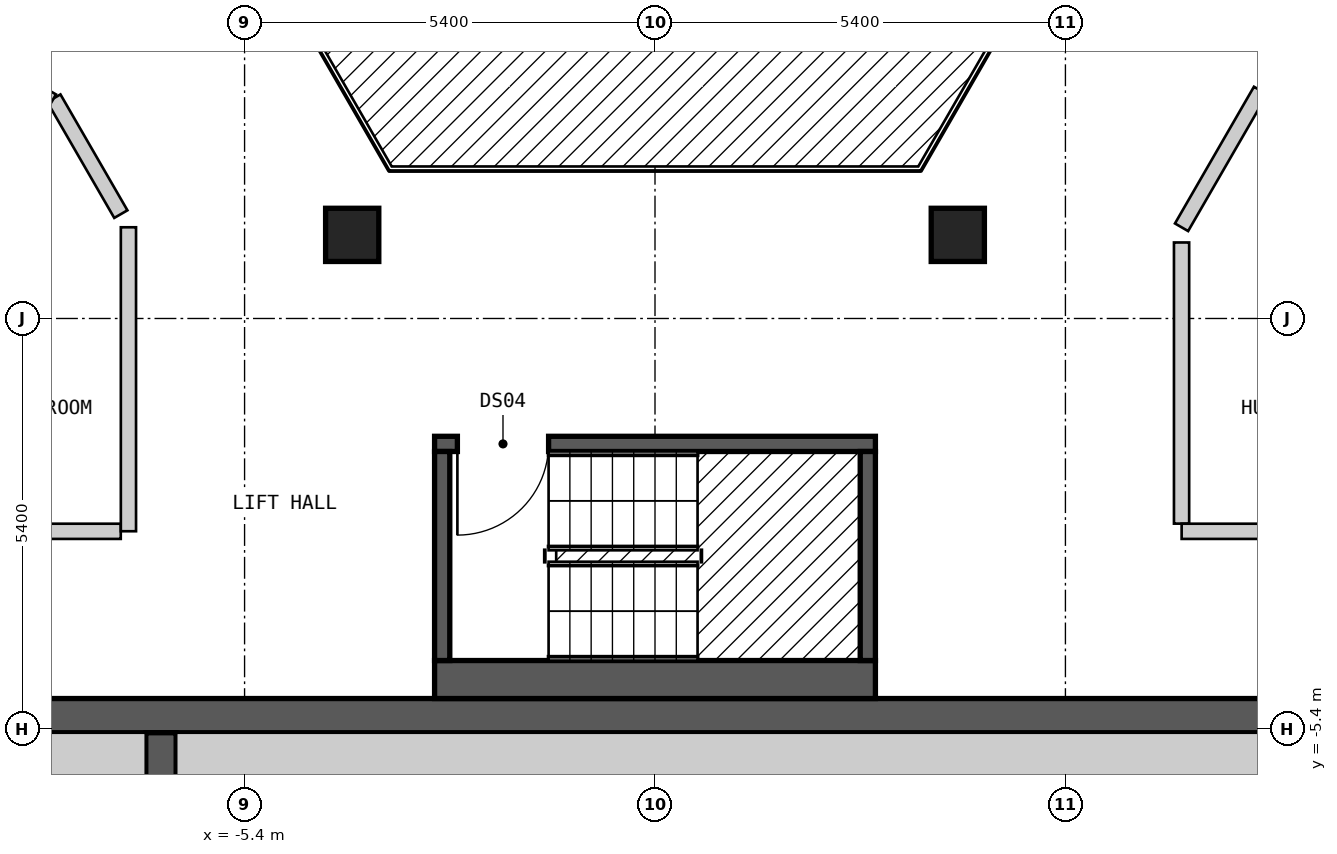
"""IFC4 building model, lengths in metres.
Left out: names, types, materials, properties, quantities, classifications, styles, units other than length and angle.
Written with IfcOpenShell. Run it as: python <this file> out.ifc"""

import sys

from ifc_helpers import new_model, si_unit, direction, frame, frame_2d, origin, origin_2d, place, context, subcontext, project, spatial, rectangle, extrude, element, fill, save


model = new_model("IFC4")
c1 = context("Model", 3, precision=1e-05, world=origin(), true_north=direction((0.0, 1.0)))
c2 = subcontext(c1, "Body", "Model", "MODEL_VIEW")
j1 = project(units=[si_unit("LENGTHUNIT", "METRE"), si_unit("PLANEANGLEUNIT", "RADIAN")], contexts=[c1])
p1 = place(None, origin())
s1 = spatial("IfcSite", under=j1, at=p1, CompositionType="ELEMENT")
p2 = place(p1, origin())
s2 = spatial("IfcBuilding", under=s1, at=p2, CompositionType="ELEMENT")
p3 = place(p2, frame((0.0, 0.0, 205.8)))
s3 = spatial("IfcBuildingStorey", under=s2, at=p3, CompositionType="ELEMENT", Elevation=205.8)
for number, where, z_axis, x_axis in (
    (1, (3.984, 1.1, 0.0), (0.0, 0.0, 1.0), (1.0, 0.0, 0.0)),
    (2, (-3.984, 1.1, 0.0), (0.0, 0.0, 1.0), (1.0, 0.0, 0.0)),
):
    element("IfcColumn", number, at=place(p3, frame(where, z_axis=z_axis, x_axis=x_axis)), inside=s3, PredefinedType="COLUMN", context=c2, shape_type="SweptSolid", body=[
        extrude(rectangle(XDim=0.7, YDim=0.7, at=origin_2d()), origin(), (0.0, 0.0, 1.0), 3.0),
    ])
p4 = place(p3, frame((-13.3, -5.225, 0.0), z_axis=(0.0, 0.0, 1.0), x_axis=(1.0, 0.0, 0.0)))
e3 = element("IfcWall", 3, at=p4, inside=s3, PredefinedType="SHEAR", context=c2, shape_type="SweptSolid", body=[
    extrude(rectangle(XDim=26.6, YDim=0.45, at=frame_2d((13.3, 0.0))), origin(), (0.0, 0.0, 1.0), 2.7),
])
p5 = place(p4, frame((23.65, 0.0, 0.0)))
e4 = element("IfcOpeningElement", 4, at=p5, cuts=e3, PredefinedType="OPENING", context=c2, shape_type="SweptSolid", body=[
    extrude(rectangle(XDim=1.2, YDim=2.1, at=frame_2d((0.6, 1.05))), frame((0.0, 0.235, 0.0), z_axis=(0.0, -1.0, 0.0), x_axis=(1.0, 0.0, 0.0)), (0.0, 0.0, 1.0), 0.47),
])
p6 = place(p3, frame((-6.5, -9.15, 0.0), z_axis=(0.0, 0.0, 1.0), x_axis=(0.0, 1.0, 0.0)))
e5 = element("IfcWall", 5, at=p6, inside=s3, PredefinedType="SHEAR", context=c2, shape_type="SweptSolid", body=[
    extrude(rectangle(XDim=3.7, YDim=0.4, at=frame_2d((1.85, 0.0))), origin(), (0.0, 0.0, 1.0), 2.7),
])
p7 = place(p3, frame((-2.9, -4.75, 0.0), z_axis=(0.0, 0.0, 1.0), x_axis=(1.0, 0.0, 0.0)))
e6 = element("IfcWall", 6, at=p7, inside=s3, PredefinedType="SOLIDWALL", context=c2, shape_type="SweptSolid", body=[
    extrude(rectangle(XDim=5.8, YDim=0.5, at=frame_2d((2.9, 0.0))), origin(), (0.0, 0.0, 1.0), 2.7),
])
p8 = place(p3, frame((-2.9, -1.65, 0.0), z_axis=(0.0, 0.0, 1.0), x_axis=(1.0, 0.0, 0.0)))
e7 = element("IfcWall", 7, at=p8, inside=s3, PredefinedType="SOLIDWALL", context=c2, shape_type="SweptSolid", body=[
    extrude(rectangle(XDim=5.8, YDim=0.2, at=frame_2d((2.9, 0.0))), origin(), (0.0, 0.0, 1.0), 2.7),
])
p9 = place(p8, frame((0.3, 0.0, 0.0)))
e8 = element("IfcOpeningElement", 8, at=p9, cuts=e7, PredefinedType="OPENING", context=c2, shape_type="SweptSolid", body=[
    extrude(rectangle(XDim=1.2, YDim=2.1, at=frame_2d((0.6, 1.05))), frame((0.0, 0.11, 0.0), z_axis=(0.0, -1.0, 0.0), x_axis=(1.0, 0.0, 0.0)), (0.0, 0.0, 1.0), 0.22),
])
for number, where, z_axis, x_axis in (
    (9, (-2.8, -4.5, 0.0), (0.0, 0.0, 1.0), (0.0, 1.0, 0.0)),
    (10, (2.8, -4.5, 0.0), (0.0, 0.0, 1.0), (0.0, 1.0, 0.0)),
):
    element("IfcWall", number, at=place(p3, frame(where, z_axis=z_axis, x_axis=x_axis)), inside=s3, PredefinedType="SOLIDWALL", context=c2, shape_type="SweptSolid", body=[
        extrude(rectangle(XDim=2.75, YDim=0.2, at=frame_2d((1.375, 0.0))), origin(), (0.0, 0.0, 1.0), 2.7),
    ])
p10 = place(p3, frame((-7.909, 2.898, 0.0), z_axis=(0.0, 0.0, 1.0), x_axis=(0.50019444547, -0.865913111531, 0.0)))
e11 = element("IfcWall", 11, at=p10, inside=s3, PredefinedType="PARTITIONING", context=c2, shape_type="SweptSolid", body=[
    extrude(rectangle(XDim=1.761, YDim=0.2, at=frame_2d((0.88, 0.0))), origin(), (0.0, 0.0, 1.0), 2.7),
])
p11 = place(p3, frame((6.928, 1.0, 0.0), z_axis=(0.0, 0.0, 1.0), x_axis=(0.0, -1.0, 0.0)))
e12 = element("IfcWall", 12, at=p11, inside=s3, PredefinedType="PARTITIONING", context=c2, shape_type="SweptSolid", body=[
    extrude(rectangle(XDim=3.699, YDim=0.2, at=frame_2d((1.85, 0.0))), origin(), (0.0, 0.0, 1.0), 2.7),
])
p12 = place(p3, frame((-9.93, -2.8, 0.0), z_axis=(0.0, 0.0, 1.0), x_axis=(1.0, 0.0, 0.0)))
e13 = element("IfcWall", 13, at=p12, inside=s3, PredefinedType="PARTITIONING", context=c2, shape_type="SweptSolid", body=[
    extrude(rectangle(XDim=2.901, YDim=0.2, at=frame_2d((1.45, 0.0))), origin(), (0.0, 0.0, 1.0), 2.7),
])
p13 = place(p3, frame((6.929, -2.8, 0.0), z_axis=(0.0, 0.0, 1.0), x_axis=(1.0, 0.0, 0.0)))
e14 = element("IfcWall", 14, at=p13, inside=s3, PredefinedType="PARTITIONING", context=c2, shape_type="SweptSolid", body=[
    extrude(rectangle(XDim=2.885, YDim=0.2, at=frame_2d((1.442, 0.0))), origin(), (0.0, 0.0, 1.0), 2.7),
])
p14 = place(p3, frame((6.928, 1.2, 0.0), z_axis=(0.0, 0.0, 1.0), x_axis=(0.500132712588, 0.865948768577, 0.0)))
e15 = element("IfcWall", 15, at=p14, inside=s3, PredefinedType="PARTITIONING", context=c2, shape_type="SweptSolid", body=[
    extrude(rectangle(XDim=2.078, YDim=0.2, at=frame_2d((1.039, 0.0))), origin(), (0.0, 0.0, 1.0), 2.7),
])
p15 = place(p3, frame((-10.623, -1.6, 0.0), z_axis=(0.0, 0.0, 1.0), x_axis=(0.500040865889, 0.866001808567, 0.0)))
e16 = element("IfcWall", 16, at=p15, inside=s3, PredefinedType="PARTITIONING", context=c2, shape_type="SweptSolid", body=[
    extrude(rectangle(XDim=5.31, YDim=0.2, at=frame_2d((2.655, 0.0))), origin(), (0.0, 0.0, 1.0), 2.7),
])
p16 = place(p15, frame((2.205, 0.0, 0.0)))
e17 = element("IfcOpeningElement", 17, at=p16, cuts=e16, PredefinedType="OPENING", context=c2, shape_type="SweptSolid", body=[
    extrude(rectangle(XDim=0.9, YDim=2.1, at=frame_2d((0.45, 1.05))), frame((0.0, 0.11, 0.0), z_axis=(0.0, -1.0, 0.0), x_axis=(1.0, 0.0, 0.0)), (0.0, 0.0, 1.0), 0.22),
])
p17 = place(p3, frame((-6.928, -2.799, 0.0), z_axis=(0.0, 0.0, 1.0), x_axis=(0.0, 1.0, 0.0)))
e18 = element("IfcWall", 18, at=p17, inside=s3, PredefinedType="PARTITIONING", context=c2, shape_type="SweptSolid", body=[
    extrude(rectangle(XDim=3.999, YDim=0.2, at=frame_2d((2.0, 0.0))), origin(), (0.0, 0.0, 1.0), 2.7),
])
p18 = place(p3, frame((-12.1, -5.825, 0.0), z_axis=(0.0, 0.0, 1.0), x_axis=(1.0, 0.0, 0.0)))
e19 = element("IfcWall", 19, at=p18, inside=s3, PredefinedType="SOLIDWALL", context=c2, shape_type="SweptSolid", body=[
    extrude(rectangle(XDim=5.4, YDim=0.75, at=frame_2d((2.7, 0.0))), origin(), (0.0, 0.0, 1.0), 2.7),
])
p19 = place(p3, frame((-6.3, -5.825, 0.0), z_axis=(0.0, 0.0, 1.0), x_axis=(1.0, 0.0, 0.0)))
e20 = element("IfcWall", 20, at=p19, inside=s3, PredefinedType="SOLIDWALL", context=c2, shape_type="SweptSolid", body=[
    extrude(rectangle(XDim=16.1, YDim=0.75, at=frame_2d((8.05, 0.0))), origin(), (0.0, 0.0, 1.0), 2.7),
])
p20 = place(p9, origin())
e21 = element("IfcDoor", 21, at=p20, inside=s3, OperationType="SINGLE_SWING_LEFT", PredefinedType="DOOR", context=c2, shape_type="SweptSolid", body=[
    extrude(rectangle(XDim=1.2, YDim=2.1, at=frame_2d((0.6, 1.05))), frame((0.0, 0.025, 0.0), z_axis=(0.0, -1.0, 0.0), x_axis=(1.0, 0.0, 0.0)), (0.0, 0.0, 1.0), 0.05),
])
fill(e8, e21)
save(model, sys.argv[1])
